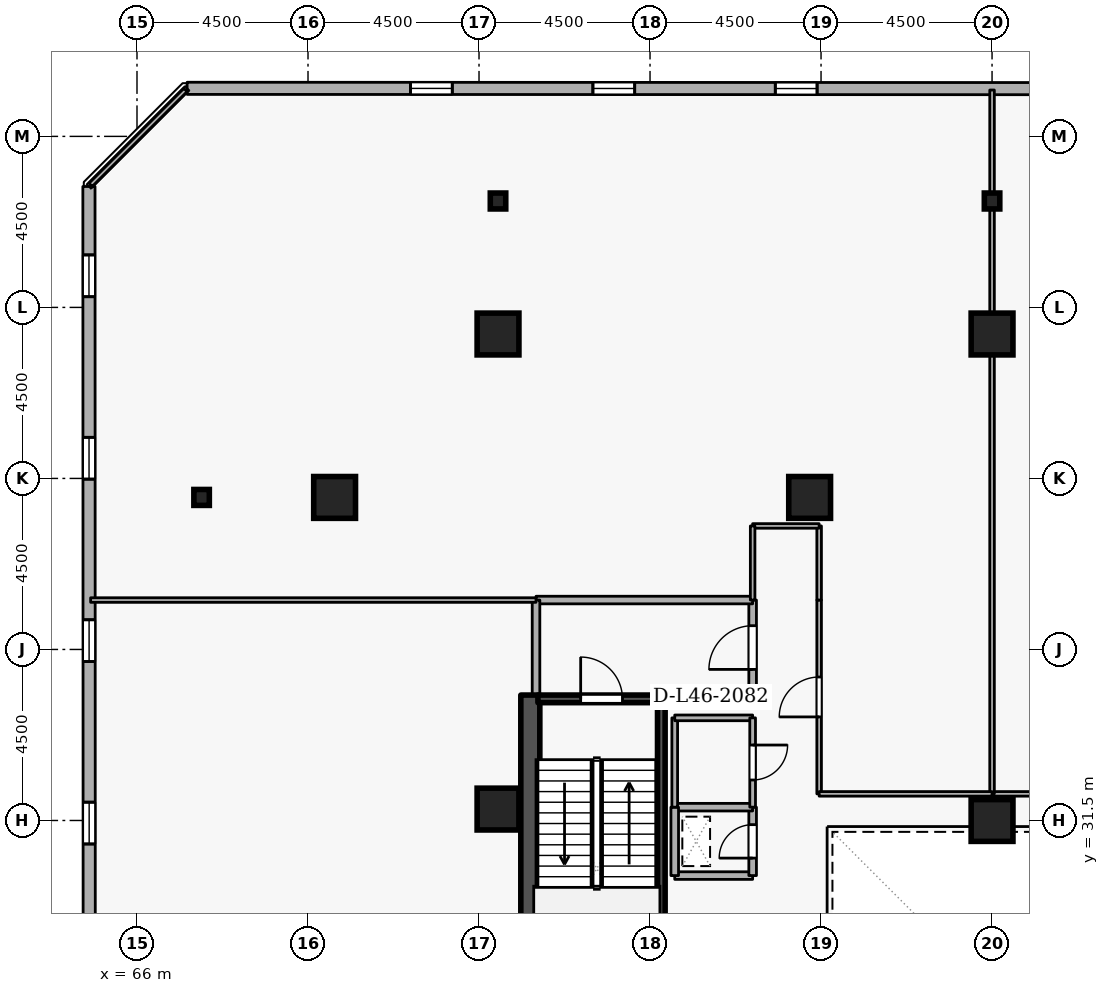
"""IFC4 building model, lengths in metres.
Left out: names, types, materials, properties, quantities, classifications, styles, units other than length and angle.
Written with IfcOpenShell. Run it as: python <this file> out.ifc"""

import sys

from ifc_helpers import new_model, si_unit, direction, frame, frame_2d, origin, origin_2d, place, context, subcontext, project, spatial, rectangle, i_section, extrude, element, fill, save


model = new_model("IFC4")
c1 = context("Model", 3, precision=1e-05, world=origin(), true_north=direction((0.0, 1.0)))
c2 = subcontext(c1, "Body", "Model", "MODEL_VIEW")
j1 = project(units=[si_unit("LENGTHUNIT", "METRE"), si_unit("PLANEANGLEUNIT", "RADIAN")], contexts=[c1])
p1 = place(None, origin())
s1 = spatial("IfcSite", under=j1, at=p1, CompositionType="ELEMENT")
p2 = place(p1, origin())
s2 = spatial("IfcBuilding", under=s1, at=p2, CompositionType="ELEMENT")
p3 = place(p2, frame((0.0, 0.0, 174.3)))
s3 = spatial("IfcBuildingStorey", under=s2, at=p3, CompositionType="ELEMENT", Elevation=174.3)
p4 = place(p3, frame((76.35, 19.2, 0.0), z_axis=(0.0, 0.0, 1.0), x_axis=(0.0, 1.0, 0.0)))
e1 = element("IfcWall", 1, at=p4, inside=s3, PredefinedType="SHEAR", context=c2, shape_type="SweptSolid", body=[
    extrude(rectangle(XDim=15.6, YDim=0.5, at=frame_2d((7.8, 0.0))), origin(), (0.0, 0.0, 1.0), 4.2),
])
for number, where, z_axis, x_axis in (
    (2, (88.5, 44.3, 0.0), (0.0, 0.0, 1.0), (1.0, 0.0, 0.0)),
    (3, (75.5, 44.3, 0.0), (0.0, 0.0, 1.0), (1.0, 0.0, 0.0)),
    (4, (71.2, 40.0, 0.0), (0.0, 0.0, 1.0), (1.0, 0.0, 0.0)),
    (5, (83.7, 40.0, 0.0), (0.0, 0.0, 1.0), (1.0, 0.0, 0.0)),
    (6, (75.5, 31.8, 0.0), (0.0, 0.0, 1.0), (1.0, 0.0, 0.0)),
    (7, (88.5, 31.5, 0.0), (0.0, 0.0, 1.0), (1.0, 0.0, 0.0)),
):
    element("IfcColumn", number, at=place(p3, frame(where, z_axis=z_axis, x_axis=x_axis)), inside=s3, PredefinedType="COLUMN", context=c2, shape_type="SweptSolid", body=[
        extrude(rectangle(XDim=1.1, YDim=1.1, at=origin_2d()), origin(), (0.0, 0.0, 1.0), 4.2),
    ])
for number, where, z_axis, x_axis in (
    (8, (88.5, 47.8, 0.0), (0.0, 0.0, 1.0), (1.0, 0.0, 0.0)),
    (9, (75.5, 47.8, 0.0), (0.0, 0.0, 1.0), (1.0, 0.0, 0.0)),
    (10, (67.7, 40.0, 0.0), (0.0, 0.0, 1.0), (1.0, 0.0, 0.0)),
):
    element("IfcColumn", number, at=place(p3, frame(where, z_axis=z_axis, x_axis=x_axis)), inside=s3, PredefinedType="COLUMN", context=c2, shape_type="SweptSolid", body=[
        extrude(i_section(OverallWidth=0.407, OverallDepth=0.419, WebThickness=0.031, FlangeThickness=0.049, FilletRadius=0.015, at=origin_2d()), origin(), (0.0, 0.0, 1.0), 4.2),
    ])
p5 = place(p3, frame((100.096, 50.753, 0.0), z_axis=(0.0, 0.0, 1.0), x_axis=(-0.999999933399, 0.000364968916, 0.0)))
e11 = element("IfcWall", 11, at=p5, inside=s3, PredefinedType="STANDARD", context=c2, shape_type="SweptSolid", body=[
    extrude(rectangle(XDim=32.778, YDim=0.32, at=frame_2d((16.389, 0.0))), origin(), (0.0, 0.0, 1.0), 3.3),
])
p6 = place(p5, frame((1.8, 0.0, 0.72)))
e12 = element("IfcOpeningElement", 12, at=p6, cuts=e11, PredefinedType="OPENING", context=c2, shape_type="SweptSolid", body=[
    extrude(rectangle(XDim=1.1, YDim=1.8, at=frame_2d((0.55, 0.9))), frame((0.0, 0.17, 0.0), z_axis=(0.0, -1.0, 0.0), x_axis=(1.0, 0.0, 0.0)), (0.0, 0.0, 1.0), 0.34),
])
p7 = place(p5, frame((6.6, 0.0, 0.72)))
e13 = element("IfcOpeningElement", 13, at=p7, cuts=e11, PredefinedType="OPENING", context=c2, shape_type="SweptSolid", body=[
    extrude(rectangle(XDim=1.1, YDim=1.8, at=frame_2d((0.55, 0.9))), frame((0.0, 0.17, 0.0), z_axis=(0.0, -1.0, 0.0), x_axis=(1.0, 0.0, 0.0)), (0.0, 0.0, 1.0), 0.34),
])
p8 = place(p5, frame((16.2, 0.0, 0.72)))
e14 = element("IfcOpeningElement", 14, at=p8, cuts=e11, PredefinedType="OPENING", context=c2, shape_type="SweptSolid", body=[
    extrude(rectangle(XDim=1.1, YDim=1.8, at=frame_2d((0.55, 0.9))), frame((0.0, 0.17, 0.0), z_axis=(0.0, -1.0, 0.0), x_axis=(1.0, 0.0, 0.0)), (0.0, 0.0, 1.0), 0.34),
])
p9 = place(p5, frame((21.0, 0.0, 0.72)))
e15 = element("IfcOpeningElement", 15, at=p9, cuts=e11, PredefinedType="OPENING", context=c2, shape_type="SweptSolid", body=[
    extrude(rectangle(XDim=1.1, YDim=1.8, at=frame_2d((0.55, 0.9))), frame((0.0, 0.17, 0.0), z_axis=(0.0, -1.0, 0.0), x_axis=(1.0, 0.0, 0.0)), (0.0, 0.0, 1.0), 0.34),
])
p10 = place(p5, frame((25.8, 0.0, 0.72)))
e16 = element("IfcOpeningElement", 16, at=p10, cuts=e11, PredefinedType="OPENING", context=c2, shape_type="SweptSolid", body=[
    extrude(rectangle(XDim=1.1, YDim=1.8, at=frame_2d((0.55, 0.9))), frame((0.0, 0.17, 0.0), z_axis=(0.0, -1.0, 0.0), x_axis=(1.0, 0.0, 0.0)), (0.0, 0.0, 1.0), 0.34),
])
p11 = place(p3, frame((64.735, 48.181, 0.0), z_axis=(0.0, 0.0, 1.0), x_axis=(0.000364968916, -0.999999933399, 0.0)))
e17 = element("IfcWall", 17, at=p11, inside=s3, PredefinedType="STANDARD", context=c2, shape_type="SweptSolid", body=[
    extrude(rectangle(XDim=32.778, YDim=0.32, at=frame_2d((16.389, 0.0))), origin(), (0.0, 0.0, 1.0), 3.3),
])
p12 = place(p11, frame((1.8, 0.0, 0.72)))
e18 = element("IfcOpeningElement", 18, at=p12, cuts=e17, PredefinedType="OPENING", context=c2, shape_type="SweptSolid", body=[
    extrude(rectangle(XDim=1.1, YDim=1.8, at=frame_2d((0.55, 0.9))), frame((0.0, 0.17, 0.0), z_axis=(0.0, -1.0, 0.0), x_axis=(1.0, 0.0, 0.0)), (0.0, 0.0, 1.0), 0.34),
])
p13 = place(p11, frame((6.6, 0.0, 0.72)))
e19 = element("IfcOpeningElement", 19, at=p13, cuts=e17, PredefinedType="OPENING", context=c2, shape_type="SweptSolid", body=[
    extrude(rectangle(XDim=1.1, YDim=1.8, at=frame_2d((0.55, 0.9))), frame((0.0, 0.17, 0.0), z_axis=(0.0, -1.0, 0.0), x_axis=(1.0, 0.0, 0.0)), (0.0, 0.0, 1.0), 0.34),
])
p14 = place(p11, frame((11.4, 0.0, 0.72)))
e20 = element("IfcOpeningElement", 20, at=p14, cuts=e17, PredefinedType="OPENING", context=c2, shape_type="SweptSolid", body=[
    extrude(rectangle(XDim=1.1, YDim=1.8, at=frame_2d((0.55, 0.9))), frame((0.0, 0.17, 0.0), z_axis=(0.0, -1.0, 0.0), x_axis=(1.0, 0.0, 0.0)), (0.0, 0.0, 1.0), 0.34),
])
p15 = place(p11, frame((16.2, 0.0, 0.72)))
e21 = element("IfcOpeningElement", 21, at=p15, cuts=e17, PredefinedType="OPENING", context=c2, shape_type="SweptSolid", body=[
    extrude(rectangle(XDim=1.1, YDim=1.8, at=frame_2d((0.55, 0.9))), frame((0.0, 0.17, 0.0), z_axis=(0.0, -1.0, 0.0), x_axis=(1.0, 0.0, 0.0)), (0.0, 0.0, 1.0), 0.34),
])
p16 = place(p11, frame((21.0, 0.0, 0.72)))
e22 = element("IfcOpeningElement", 22, at=p16, cuts=e17, PredefinedType="OPENING", context=c2, shape_type="SweptSolid", body=[
    extrude(rectangle(XDim=1.1, YDim=1.8, at=frame_2d((0.55, 0.9))), frame((0.0, 0.17, 0.0), z_axis=(0.0, -1.0, 0.0), x_axis=(1.0, 0.0, 0.0)), (0.0, 0.0, 1.0), 0.34),
])
p17 = place(p11, frame((25.8, 0.0, 0.72)))
e23 = element("IfcOpeningElement", 23, at=p17, cuts=e17, PredefinedType="OPENING", context=c2, shape_type="SweptSolid", body=[
    extrude(rectangle(XDim=1.1, YDim=1.8, at=frame_2d((0.55, 0.9))), frame((0.0, 0.17, 0.0), z_axis=(0.0, -1.0, 0.0), x_axis=(1.0, 0.0, 0.0)), (0.0, 0.0, 1.0), 0.34),
])
p18 = place(p3, frame((76.55, 34.7, 0.0), z_axis=(0.0, 0.0, 1.0), x_axis=(1.0, 0.0, 0.0)))
e24 = element("IfcWall", 24, at=p18, inside=s3, PredefinedType="SHEAR", context=c2, shape_type="SweptSolid", body=[
    extrude(rectangle(XDim=3.35, YDim=0.2, at=frame_2d((1.675, 0.0))), origin(), (0.0, 0.0, 1.0), 4.2),
])
p19 = place(p18, frame((1.125, 0.0, 0.0)))
e25 = element("IfcOpeningElement", 25, at=p19, cuts=e24, PredefinedType="OPENING", context=c2, shape_type="SweptSolid", body=[
    extrude(rectangle(XDim=1.1, YDim=2.1, at=frame_2d((0.55, 1.05))), frame((0.0, 0.11, 0.0), z_axis=(0.0, -1.0, 0.0), x_axis=(1.0, 0.0, 0.0)), (0.0, 0.0, 1.0), 0.22),
])
p20 = place(p3, frame((79.797, 27.45, 0.0), z_axis=(0.0, 0.0, 1.0), x_axis=(0.0, 1.0, 0.0)))
e26 = element("IfcWall", 26, at=p20, inside=s3, PredefinedType="SHEAR", context=c2, shape_type="SweptSolid", body=[
    extrude(rectangle(XDim=7.1, YDim=0.2, at=frame_2d((3.55, 0.0))), origin(), (0.0, 0.0, 1.0), 4.2),
])
p21 = place(p3, frame((79.9, 34.8, 0.0), z_axis=(0.0, 0.0, 1.0), x_axis=(1.0, 0.0, 0.0)))
e27 = element("IfcWall", 27, at=p21, inside=s3, PredefinedType="STANDARD", context=c2, shape_type="SweptSolid", body=[
    extrude(rectangle(XDim=2.3, YDim=0.2, at=frame_2d((1.15, 0.0))), origin(), (0.0, 0.0, 1.0), 3.145),
])
p22 = place(p3, frame((82.2, 34.8, 0.0), z_axis=(0.0, 0.0, 1.0), x_axis=(0.0, 1.0, 0.0)))
e28 = element("IfcWall", 28, at=p22, inside=s3, PredefinedType="STANDARD", context=c2, shape_type="SweptSolid", body=[
    extrude(rectangle(XDim=2.5, YDim=0.2, at=frame_2d((1.25, 0.0))), origin(), (0.0, 0.0, 1.0), 3.94),
])
p23 = place(p22, frame((0.675, 0.0, 0.0)))
e29 = element("IfcOpeningElement", 29, at=p23, cuts=e28, PredefinedType="OPENING", context=c2, shape_type="SweptSolid", body=[
    extrude(rectangle(XDim=1.15, YDim=2.1, at=frame_2d((0.575, 1.05))), frame((0.0, 0.11, 0.0), z_axis=(0.0, -1.0, 0.0), x_axis=(1.0, 0.0, 0.0)), (0.0, 0.0, 1.0), 0.22),
])
p24 = place(p3, frame((82.2, 37.3, 0.0), z_axis=(0.0, 0.0, 1.0), x_axis=(-1.0, 0.0, 0.0)))
e30 = element("IfcWall", 30, at=p24, inside=s3, PredefinedType="STANDARD", context=c2, shape_type="SweptSolid", body=[
    extrude(rectangle(XDim=5.7, YDim=0.2, at=frame_2d((2.85, 0.0))), origin(), (0.0, 0.0, 1.0), 3.94),
])
p25 = place(p3, frame((76.5, 37.3, 0.0), z_axis=(0.0, 0.0, 1.0), x_axis=(0.0, -1.0, 0.0)))
e31 = element("IfcWall", 31, at=p25, inside=s3, PredefinedType="STANDARD", context=c2, shape_type="SweptSolid", body=[
    extrude(rectangle(XDim=2.5, YDim=0.2, at=frame_2d((1.25, 0.0))), origin(), (0.0, 0.0, 1.0), 3.94),
])
p26 = place(p3, frame((80.15, 30.05, 0.0), z_axis=(0.0, 0.0, 1.0), x_axis=(1.0, 0.0, 0.0)))
e32 = element("IfcWall", 32, at=p26, inside=s3, PredefinedType="STANDARD", context=c2, shape_type="SweptSolid", body=[
    extrude(rectangle(XDim=2.05, YDim=0.2, at=frame_2d((1.025, 0.0))), origin(), (0.0, 0.0, 1.0), 3.94),
])
p27 = place(p3, frame((82.2, 30.05, 0.0), z_axis=(0.0, 0.0, 1.0), x_axis=(0.0, 1.0, 0.0)))
e33 = element("IfcWall", 33, at=p27, inside=s3, PredefinedType="STANDARD", context=c2, shape_type="SweptSolid", body=[
    extrude(rectangle(XDim=1.8, YDim=0.2, at=frame_2d((0.9, 0.0))), origin(), (0.0, 0.0, 1.0), 3.94),
])
p28 = place(p27, frame((0.46, 0.0, 0.0)))
e34 = element("IfcOpeningElement", 34, at=p28, cuts=e33, PredefinedType="OPENING", context=c2, shape_type="SweptSolid", body=[
    extrude(rectangle(XDim=0.88, YDim=2.04, at=frame_2d((0.44, 1.02))), frame((0.0, 0.11, 0.0), z_axis=(0.0, -1.0, 0.0), x_axis=(1.0, 0.0, 0.0)), (0.0, 0.0, 1.0), 0.22),
])
p29 = place(p3, frame((82.2, 31.85, 0.0), z_axis=(0.0, 0.0, 1.0), x_axis=(-1.0, 0.0, 0.0)))
e35 = element("IfcWall", 35, at=p29, inside=s3, PredefinedType="STANDARD", context=c2, shape_type="SweptSolid", body=[
    extrude(rectangle(XDim=2.05, YDim=0.2, at=frame_2d((1.025, 0.0))), origin(), (0.0, 0.0, 1.0), 3.94),
])
p30 = place(p3, frame((80.15, 31.85, 0.0), z_axis=(0.0, 0.0, 1.0), x_axis=(0.0, -1.0, 0.0)))
e36 = element("IfcWall", 36, at=p30, inside=s3, PredefinedType="STANDARD", context=c2, shape_type="SweptSolid", body=[
    extrude(rectangle(XDim=1.8, YDim=0.2, at=frame_2d((0.9, 0.0))), origin(), (0.0, 0.0, 1.0), 3.94),
])
p31 = place(p3, frame((80.15, 31.85, 0.0), z_axis=(0.0, 0.0, 1.0), x_axis=(0.0, 1.0, 0.0)))
e37 = element("IfcWall", 37, at=p31, inside=s3, PredefinedType="PARTITIONING", context=c2, shape_type="SweptSolid", body=[
    extrude(rectangle(XDim=2.35, YDim=0.15, at=frame_2d((1.175, 0.0))), origin(), (0.0, 0.0, 1.0), 3.94),
])
p32 = place(p3, frame((80.15, 34.2, 0.0), z_axis=(0.0, 0.0, 1.0), x_axis=(1.0, 0.0, 0.0)))
e38 = element("IfcWall", 38, at=p32, inside=s3, PredefinedType="PARTITIONING", context=c2, shape_type="SweptSolid", body=[
    extrude(rectangle(XDim=2.05, YDim=0.15, at=frame_2d((1.025, 0.0))), origin(), (0.0, 0.0, 1.0), 3.145),
])
p33 = place(p3, frame((82.2, 34.2, 0.0), z_axis=(0.0, 0.0, 1.0), x_axis=(0.0, -1.0, 0.0)))
e39 = element("IfcWall", 39, at=p33, inside=s3, PredefinedType="PARTITIONING", context=c2, shape_type="SweptSolid", body=[
    extrude(rectangle(XDim=2.35, YDim=0.15, at=frame_2d((1.175, 0.0))), origin(), (0.0, 0.0, 1.0), 3.94),
])
p34 = place(p33, frame((0.715, 0.0, 0.0)))
e40 = element("IfcOpeningElement", 40, at=p34, cuts=e39, PredefinedType="OPENING", context=c2, shape_type="SweptSolid", body=[
    extrude(rectangle(XDim=0.92, YDim=2.08, at=frame_2d((0.46, 1.04))), frame((0.0, 0.085, 0.0), z_axis=(0.0, -1.0, 0.0), x_axis=(1.0, 0.0, 0.0)), (0.0, 0.0, 1.0), 0.17),
])
p35 = place(p3, frame((93.05, 32.2, 0.0), z_axis=(0.0, 0.0, 1.0), x_axis=(-1.0, 0.0, 0.0)))
e41 = element("IfcWall", 41, at=p35, inside=s3, PredefinedType="PARTITIONING", context=c2, shape_type="SweptSolid", body=[
    extrude(rectangle(XDim=4.55, YDim=0.12, at=frame_2d((2.275, 0.0))), origin(), (0.0, 0.0, 1.0), 3.94),
])
p36 = place(p3, frame((88.5, 32.2, 0.0), z_axis=(0.0, 0.0, 1.0), x_axis=(0.0, 1.0, 0.0)))
e42 = element("IfcWall", 42, at=p36, inside=s3, PredefinedType="PARTITIONING", context=c2, shape_type="SweptSolid", body=[
    extrude(rectangle(XDim=18.52, YDim=0.12, at=frame_2d((9.26, 0.0))), origin(), (0.0, 0.0, 1.0), 3.532),
])
p37 = place(p3, frame((83.95, 32.2, 0.0), z_axis=(0.0, 0.0, 1.0), x_axis=(0.0, 1.0, 0.0)))
e43 = element("IfcWall", 43, at=p37, inside=s3, PredefinedType="PARTITIONING", context=c2, shape_type="SweptSolid", body=[
    extrude(rectangle(XDim=5.1, YDim=0.12, at=frame_2d((2.55, 0.0))), origin(), (0.0, 0.0, 1.0), 3.94),
])
p38 = place(p37, frame((2.025, 0.0, 0.0)))
e44 = element("IfcOpeningElement", 44, at=p38, cuts=e43, PredefinedType="OPENING", context=c2, shape_type="SweptSolid", body=[
    extrude(rectangle(XDim=1.05, YDim=2.1, at=frame_2d((0.525, 1.05))), frame((0.0, 0.07, 0.0), z_axis=(0.0, -1.0, 0.0), x_axis=(1.0, 0.0, 0.0)), (0.0, 0.0, 1.0), 0.14),
])
p39 = place(p3, frame((83.95, 37.3, 0.0), z_axis=(0.0, 0.0, 1.0), x_axis=(0.0, 1.0, 0.0)))
e45 = element("IfcWall", 45, at=p39, inside=s3, PredefinedType="PARTITIONING", context=c2, shape_type="SweptSolid", body=[
    extrude(rectangle(XDim=1.95, YDim=0.12, at=frame_2d((0.975, 0.0))), origin(), (0.0, 0.0, 1.0), 3.94),
])
p40 = place(p3, frame((83.95, 39.25, 0.0), z_axis=(0.0, 0.0, 1.0), x_axis=(-1.0, 0.0, 0.0)))
e46 = element("IfcWall", 46, at=p40, inside=s3, PredefinedType="PARTITIONING", context=c2, shape_type="SweptSolid", body=[
    extrude(rectangle(XDim=1.75, YDim=0.12, at=frame_2d((0.875, 0.0))), origin(), (0.0, 0.0, 1.0), 3.94),
])
p41 = place(p3, frame((82.2, 39.25, 0.0), z_axis=(0.0, 0.0, 1.0), x_axis=(0.0, -1.0, 0.0)))
e47 = element("IfcWall", 47, at=p41, inside=s3, PredefinedType="PARTITIONING", context=c2, shape_type="SweptSolid", body=[
    extrude(rectangle(XDim=1.95, YDim=0.12, at=frame_2d((0.975, 0.0))), origin(), (0.0, 0.0, 1.0), 3.94),
])
p42 = place(p3, frame((76.5, 37.3, 0.0), z_axis=(0.0, 0.0, 1.0), x_axis=(-1.0, 0.0, 0.0)))
e48 = element("IfcWall", 48, at=p42, inside=s3, PredefinedType="PARTITIONING", context=c2, shape_type="SweptSolid", body=[
    extrude(rectangle(XDim=11.72, YDim=0.12, at=frame_2d((5.86, 0.0))), origin(), (0.0, 0.0, 1.0), 3.94),
])
p43 = place(p3, frame((64.78, 48.225, 0.0), z_axis=(0.0, 0.0, 1.0), x_axis=(0.707106781187, 0.707106781187, 0.0)))
e49 = element("IfcWall", 49, at=p43, inside=s3, PredefinedType="PARTITIONING", context=c2, shape_type="SweptSolid", body=[
    extrude(rectangle(XDim=3.528, YDim=0.12, at=frame_2d((1.764, 0.0))), origin(), (0.0, 0.0, 1.0), 3.94),
])
p44 = place(p3, frame((88.5, 32.2, 0.0), z_axis=(0.0, 0.0, 1.0), x_axis=(-1.0, 0.0, 0.0)))
e50 = element("IfcWall", 50, at=p44, inside=s3, PredefinedType="PARTITIONING", context=c2, shape_type="SweptSolid", body=[
    extrude(rectangle(XDim=4.55, YDim=0.12, at=frame_2d((2.275, 0.0))), origin(), (0.0, 0.0, 1.0), 3.94),
])
p45 = place(p8, origin())
e51 = element("IfcWindow", 51, at=p45, inside=s3, PartitioningType="SINGLE_PANEL", PredefinedType="WINDOW", context=c2, shape_type="SweptSolid", body=[
    extrude(rectangle(XDim=1.1, YDim=1.8, at=frame_2d((0.55, 0.9))), frame((0.0, 0.03, 0.0), z_axis=(0.0, -1.0, 0.0), x_axis=(1.0, 0.0, 0.0)), (0.0, 0.0, 1.0), 0.06),
])
fill(e14, e51)
p46 = place(p9, origin())
e52 = element("IfcWindow", 52, at=p46, inside=s3, PartitioningType="SINGLE_PANEL", PredefinedType="WINDOW", context=c2, shape_type="SweptSolid", body=[
    extrude(rectangle(XDim=1.1, YDim=1.8, at=frame_2d((0.55, 0.9))), frame((0.0, 0.03, 0.0), z_axis=(0.0, -1.0, 0.0), x_axis=(1.0, 0.0, 0.0)), (0.0, 0.0, 1.0), 0.06),
])
fill(e15, e52)
p47 = place(p10, origin())
e53 = element("IfcWindow", 53, at=p47, inside=s3, PartitioningType="SINGLE_PANEL", PredefinedType="WINDOW", context=c2, shape_type="SweptSolid", body=[
    extrude(rectangle(XDim=1.1, YDim=1.8, at=frame_2d((0.55, 0.9))), frame((0.0, 0.03, 0.0), z_axis=(0.0, -1.0, 0.0), x_axis=(1.0, 0.0, 0.0)), (0.0, 0.0, 1.0), 0.06),
])
fill(e16, e53)
p48 = place(p12, origin())
e54 = element("IfcWindow", 54, at=p48, inside=s3, PartitioningType="SINGLE_PANEL", PredefinedType="WINDOW", context=c2, shape_type="SweptSolid", body=[
    extrude(rectangle(XDim=1.1, YDim=1.8, at=frame_2d((0.55, 0.9))), frame((0.0, 0.03, 0.0), z_axis=(0.0, -1.0, 0.0), x_axis=(1.0, 0.0, 0.0)), (0.0, 0.0, 1.0), 0.06),
])
fill(e18, e54)
p49 = place(p13, origin())
e55 = element("IfcWindow", 55, at=p49, inside=s3, PartitioningType="SINGLE_PANEL", PredefinedType="WINDOW", context=c2, shape_type="SweptSolid", body=[
    extrude(rectangle(XDim=1.1, YDim=1.8, at=frame_2d((0.55, 0.9))), frame((0.0, 0.03, 0.0), z_axis=(0.0, -1.0, 0.0), x_axis=(1.0, 0.0, 0.0)), (0.0, 0.0, 1.0), 0.06),
])
fill(e19, e55)
p50 = place(p14, origin())
e56 = element("IfcWindow", 56, at=p50, inside=s3, PartitioningType="SINGLE_PANEL", PredefinedType="WINDOW", context=c2, shape_type="SweptSolid", body=[
    extrude(rectangle(XDim=1.1, YDim=1.8, at=frame_2d((0.55, 0.9))), frame((0.0, 0.03, 0.0), z_axis=(0.0, -1.0, 0.0), x_axis=(1.0, 0.0, 0.0)), (0.0, 0.0, 1.0), 0.06),
])
fill(e20, e56)
p51 = place(p15, origin())
e57 = element("IfcWindow", 57, at=p51, inside=s3, PartitioningType="SINGLE_PANEL", PredefinedType="WINDOW", context=c2, shape_type="SweptSolid", body=[
    extrude(rectangle(XDim=1.1, YDim=1.8, at=frame_2d((0.55, 0.9))), frame((0.0, 0.03, 0.0), z_axis=(0.0, -1.0, 0.0), x_axis=(1.0, 0.0, 0.0)), (0.0, 0.0, 1.0), 0.06),
])
fill(e21, e57)
p52 = place(p19, origin())
e58 = element("IfcDoor", 58, at=p52, inside=s3, OperationType="SINGLE_SWING_LEFT", PredefinedType="DOOR", context=c2, shape_type="SweptSolid", body=[
    extrude(rectangle(XDim=1.1, YDim=2.1, at=frame_2d((0.55, 1.05))), frame((0.0, 0.025, 0.0), z_axis=(0.0, -1.0, 0.0), x_axis=(1.0, 0.0, 0.0)), (0.0, 0.0, 1.0), 0.05),
])
fill(e25, e58)
p53 = place(p23, origin())
e59 = element("IfcDoor", 59, at=p53, inside=s3, OperationType="SINGLE_SWING_LEFT", PredefinedType="DOOR", context=c2, shape_type="SweptSolid", body=[
    extrude(rectangle(XDim=1.15, YDim=2.1, at=frame_2d((0.575, 1.05))), frame((0.0, 0.025, 0.0), z_axis=(0.0, -1.0, 0.0), x_axis=(1.0, 0.0, 0.0)), (0.0, 0.0, 1.0), 0.05),
])
fill(e29, e59)
p54 = place(p28, origin())
e60 = element("IfcDoor", 60, at=p54, inside=s3, OperationType="SINGLE_SWING_LEFT", PredefinedType="DOOR", context=c2, shape_type="SweptSolid", body=[
    extrude(rectangle(XDim=0.88, YDim=2.04, at=frame_2d((0.44, 1.02))), frame((0.0, 0.025, 0.0), z_axis=(0.0, -1.0, 0.0), x_axis=(1.0, 0.0, 0.0)), (0.0, 0.0, 1.0), 0.05),
])
fill(e34, e60)
p55 = place(p34, origin())
e61 = element("IfcDoor", 61, at=p55, inside=s3, OperationType="SINGLE_SWING_LEFT", PredefinedType="DOOR", context=c2, shape_type="SweptSolid", body=[
    extrude(rectangle(XDim=0.92, YDim=2.08, at=frame_2d((0.46, 1.04))), frame((0.0, 0.025, 0.0), z_axis=(0.0, -1.0, 0.0), x_axis=(1.0, 0.0, 0.0)), (0.0, 0.0, 1.0), 0.05),
])
fill(e40, e61)
p56 = place(p38, origin())
e62 = element("IfcDoor", 62, at=p56, inside=s3, OperationType="SINGLE_SWING_LEFT", PredefinedType="DOOR", context=c2, shape_type="SweptSolid", body=[
    extrude(rectangle(XDim=1.05, YDim=2.1, at=frame_2d((0.525, 1.05))), frame((0.0, 0.025, 0.0), z_axis=(0.0, -1.0, 0.0), x_axis=(1.0, 0.0, 0.0)), (0.0, 0.0, 1.0), 0.05),
])
fill(e44, e62)
save(model, sys.argv[1])
